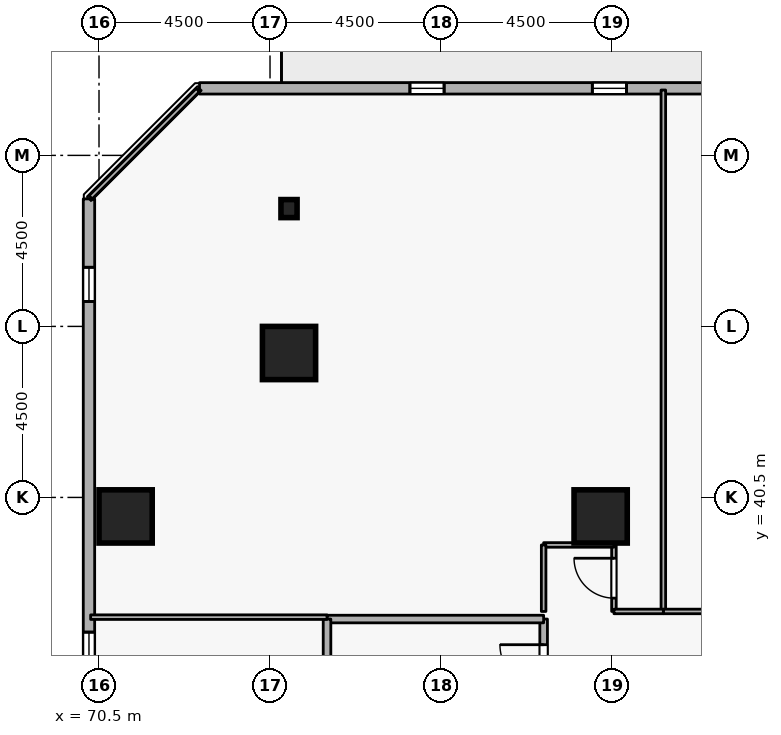
"""IFC4 building model, lengths in metres.
Left out: names, types, materials, properties, quantities, classifications, styles, units other than length and angle.
Written with IfcOpenShell. Run it as: python <this file> out.ifc"""

import sys

from ifc_helpers import new_model, si_unit, direction, frame, frame_2d, origin, origin_2d, place, context, subcontext, project, spatial, rectangle, i_section, extrude, element, fill, save


model = new_model("IFC4")
c1 = context("Model", 3, precision=1e-05, world=origin(), true_north=direction((0.0, 1.0)))
c2 = subcontext(c1, "Body", "Model", "MODEL_VIEW")
j1 = project(units=[si_unit("LENGTHUNIT", "METRE"), si_unit("PLANEANGLEUNIT", "RADIAN")], contexts=[c1])
p1 = place(None, origin())
s1 = spatial("IfcSite", under=j1, at=p1, CompositionType="ELEMENT")
p2 = place(p1, origin())
s2 = spatial("IfcBuilding", under=s1, at=p2, CompositionType="ELEMENT")
p3 = place(p2, frame((0.0, 0.0, 64.5)))
s3 = spatial("IfcBuildingStorey", under=s2, at=p3, CompositionType="ELEMENT", Elevation=64.5)
for number, where, z_axis, x_axis in (
    (1, (75.5, 44.3, 0.0), (0.0, 0.0, 1.0), (1.0, 0.0, 0.0)),
    (2, (71.2, 40.0, 0.0), (0.0, 0.0, 1.0), (1.0, 0.0, 0.0)),
    (3, (83.7, 40.0, 0.0), (0.0, 0.0, 1.0), (1.0, 0.0, 0.0)),
):
    element("IfcColumn", number, at=place(p3, frame(where, z_axis=z_axis, x_axis=x_axis)), inside=s3, PredefinedType="COLUMN", context=c2, shape_type="SweptSolid", body=[
        extrude(rectangle(XDim=1.4, YDim=1.4, at=origin_2d()), origin(), (0.0, 0.0, 1.0), 3.6),
    ])
p4 = place(p3, frame((75.5, 48.1, 0.0), z_axis=(0.0, 0.0, 1.0), x_axis=(1.0, 0.0, 0.0)))
e4 = element("IfcColumn", 4, at=p4, inside=s3, PredefinedType="COLUMN", context=c2, shape_type="SweptSolid", body=[
    extrude(i_section(OverallWidth=0.424, OverallDepth=0.475, WebThickness=0.048, FlangeThickness=0.077, FilletRadius=0.015, at=origin_2d()), origin(), (0.0, 0.0, 1.0), 3.6),
])
p5 = place(p3, frame((110.181, 51.265, 0.0), z_axis=(0.0, 0.0, 1.0), x_axis=(-0.999999999457, -3.2959355e-05, 0.0)))
e5 = element("IfcWall", 5, at=p5, inside=s3, PredefinedType="STANDARD", context=c2, shape_type="SweptSolid", body=[
    extrude(rectangle(XDim=37.037, YDim=0.3, at=frame_2d((18.518, 0.0))), origin(), (0.0, 0.0, 1.0), 2.7),
])
p6 = place(p5, frame((20.318, 0.0, 0.0)))
e6 = element("IfcOpeningElement", 6, at=p6, cuts=e5, PredefinedType="OPENING", context=c2, shape_type="SweptSolid", body=[
    extrude(rectangle(XDim=1.0, YDim=2.08, at=frame_2d((0.5, 1.04))), frame((0.0, 0.16, 0.0), z_axis=(0.0, -1.0, 0.0), x_axis=(1.0, 0.0, 0.0)), (0.0, 0.0, 1.0), 0.32),
])
p7 = place(p5, frame((1.8, 0.0, 0.72)))
e7 = element("IfcOpeningElement", 7, at=p7, cuts=e5, PredefinedType="OPENING", context=c2, shape_type="SweptSolid", body=[
    extrude(rectangle(XDim=0.9, YDim=1.75, at=frame_2d((0.45, 0.875))), frame((0.0, 0.16, 0.0), z_axis=(0.0, -1.0, 0.0), x_axis=(1.0, 0.0, 0.0)), (0.0, 0.0, 1.0), 0.32),
])
p8 = place(p5, frame((6.6, 0.0, 0.72)))
e8 = element("IfcOpeningElement", 8, at=p8, cuts=e5, PredefinedType="OPENING", context=c2, shape_type="SweptSolid", body=[
    extrude(rectangle(XDim=0.9, YDim=1.75, at=frame_2d((0.45, 0.875))), frame((0.0, 0.16, 0.0), z_axis=(0.0, -1.0, 0.0), x_axis=(1.0, 0.0, 0.0)), (0.0, 0.0, 1.0), 0.32),
])
p9 = place(p5, frame((11.4, 0.0, 0.72)))
e9 = element("IfcOpeningElement", 9, at=p9, cuts=e5, PredefinedType="OPENING", context=c2, shape_type="SweptSolid", body=[
    extrude(rectangle(XDim=0.9, YDim=1.75, at=frame_2d((0.45, 0.875))), frame((0.0, 0.16, 0.0), z_axis=(0.0, -1.0, 0.0), x_axis=(1.0, 0.0, 0.0)), (0.0, 0.0, 1.0), 0.32),
])
p10 = place(p5, frame((16.2, 0.0, 0.72)))
e10 = element("IfcOpeningElement", 10, at=p10, cuts=e5, PredefinedType="OPENING", context=c2, shape_type="SweptSolid", body=[
    extrude(rectangle(XDim=0.9, YDim=1.75, at=frame_2d((0.45, 0.875))), frame((0.0, 0.16, 0.0), z_axis=(0.0, -1.0, 0.0), x_axis=(1.0, 0.0, 0.0)), (0.0, 0.0, 1.0), 0.32),
])
p11 = place(p5, frame((25.8, 0.0, 0.72)))
e11 = element("IfcOpeningElement", 11, at=p11, cuts=e5, PredefinedType="OPENING", context=c2, shape_type="SweptSolid", body=[
    extrude(rectangle(XDim=0.9, YDim=1.75, at=frame_2d((0.45, 0.875))), frame((0.0, 0.16, 0.0), z_axis=(0.0, -1.0, 0.0), x_axis=(1.0, 0.0, 0.0)), (0.0, 0.0, 1.0), 0.32),
])
p12 = place(p5, frame((30.6, 0.0, 0.72)))
e12 = element("IfcOpeningElement", 12, at=p12, cuts=e5, PredefinedType="OPENING", context=c2, shape_type="SweptSolid", body=[
    extrude(rectangle(XDim=0.9, YDim=1.75, at=frame_2d((0.45, 0.875))), frame((0.0, 0.16, 0.0), z_axis=(0.0, -1.0, 0.0), x_axis=(1.0, 0.0, 0.0)), (0.0, 0.0, 1.0), 0.32),
])
p13 = place(p3, frame((70.236, 48.355, 0.0), z_axis=(0.0, 0.0, 1.0), x_axis=(-3.2959355e-05, -0.999999999457, 0.0)))
e13 = element("IfcWall", 13, at=p13, inside=s3, PredefinedType="STANDARD", context=c2, shape_type="SweptSolid", body=[
    extrude(rectangle(XDim=37.037, YDim=0.3, at=frame_2d((18.518, 0.0))), origin(), (0.0, 0.0, 1.0), 2.7),
])
p14 = place(p13, frame((1.8, 0.0, 0.72)))
e14 = element("IfcOpeningElement", 14, at=p14, cuts=e13, PredefinedType="OPENING", context=c2, shape_type="SweptSolid", body=[
    extrude(rectangle(XDim=0.9, YDim=1.75, at=frame_2d((0.45, 0.875))), frame((0.0, 0.16, 0.0), z_axis=(0.0, -1.0, 0.0), x_axis=(1.0, 0.0, 0.0)), (0.0, 0.0, 1.0), 0.32),
])
p15 = place(p13, frame((11.4, 0.0, 0.72)))
e15 = element("IfcOpeningElement", 15, at=p15, cuts=e13, PredefinedType="OPENING", context=c2, shape_type="SweptSolid", body=[
    extrude(rectangle(XDim=0.9, YDim=1.75, at=frame_2d((0.45, 0.875))), frame((0.0, 0.16, 0.0), z_axis=(0.0, -1.0, 0.0), x_axis=(1.0, 0.0, 0.0)), (0.0, 0.0, 1.0), 0.32),
])
p16 = place(p13, frame((16.2, 0.0, 0.72)))
e16 = element("IfcOpeningElement", 16, at=p16, cuts=e13, PredefinedType="OPENING", context=c2, shape_type="SweptSolid", body=[
    extrude(rectangle(XDim=0.9, YDim=1.75, at=frame_2d((0.45, 0.875))), frame((0.0, 0.16, 0.0), z_axis=(0.0, -1.0, 0.0), x_axis=(1.0, 0.0, 0.0)), (0.0, 0.0, 1.0), 0.32),
])
p17 = place(p13, frame((25.8, 0.0, 0.72)))
e17 = element("IfcOpeningElement", 17, at=p17, cuts=e13, PredefinedType="OPENING", context=c2, shape_type="SweptSolid", body=[
    extrude(rectangle(XDim=0.9, YDim=1.75, at=frame_2d((0.45, 0.875))), frame((0.0, 0.16, 0.0), z_axis=(0.0, -1.0, 0.0), x_axis=(1.0, 0.0, 0.0)), (0.0, 0.0, 1.0), 0.32),
])
p18 = place(p13, frame((30.6, 0.0, 0.72)))
e18 = element("IfcOpeningElement", 18, at=p18, cuts=e13, PredefinedType="OPENING", context=c2, shape_type="SweptSolid", body=[
    extrude(rectangle(XDim=0.9, YDim=1.75, at=frame_2d((0.45, 0.875))), frame((0.0, 0.16, 0.0), z_axis=(0.0, -1.0, 0.0), x_axis=(1.0, 0.0, 0.0)), (0.0, 0.0, 1.0), 0.32),
])
p19 = place(p3, frame((82.2, 34.8, 0.0), z_axis=(0.0, 0.0, 1.0), x_axis=(0.0, 1.0, 0.0)))
e19 = element("IfcWall", 19, at=p19, inside=s3, PredefinedType="STANDARD", context=c2, shape_type="SweptSolid", body=[
    extrude(rectangle(XDim=2.5, YDim=0.2, at=frame_2d((1.25, 0.0))), origin(), (0.0, 0.0, 1.0), 3.34),
])
p20 = place(p19, frame((0.675, 0.0, 0.0)))
e20 = element("IfcOpeningElement", 20, at=p20, cuts=e19, PredefinedType="OPENING", context=c2, shape_type="SweptSolid", body=[
    extrude(rectangle(XDim=1.15, YDim=2.1, at=frame_2d((0.575, 1.05))), frame((0.0, 0.11, 0.0), z_axis=(0.0, -1.0, 0.0), x_axis=(1.0, 0.0, 0.0)), (0.0, 0.0, 1.0), 0.22),
])
p21 = place(p3, frame((82.2, 37.3, 0.0), z_axis=(0.0, 0.0, 1.0), x_axis=(-1.0, 0.0, 0.0)))
e21 = element("IfcWall", 21, at=p21, inside=s3, PredefinedType="STANDARD", context=c2, shape_type="SweptSolid", body=[
    extrude(rectangle(XDim=5.7, YDim=0.2, at=frame_2d((2.85, 0.0))), origin(), (0.0, 0.0, 1.0), 3.34),
])
p22 = place(p3, frame((76.5, 37.3, 0.0), z_axis=(0.0, 0.0, 1.0), x_axis=(0.0, -1.0, 0.0)))
e22 = element("IfcWall", 22, at=p22, inside=s3, PredefinedType="STANDARD", context=c2, shape_type="SweptSolid", body=[
    extrude(rectangle(XDim=2.5, YDim=0.2, at=frame_2d((1.25, 0.0))), origin(), (0.0, 0.0, 1.0), 3.34),
])
p23 = place(p3, frame((85.35, 37.5, 0.0), z_axis=(0.0, 0.0, 1.0), x_axis=(0.0, 1.0, 0.0)))
e23 = element("IfcWall", 23, at=p23, inside=s3, PredefinedType="PARTITIONING", context=c2, shape_type="SweptSolid", body=[
    extrude(rectangle(XDim=13.72, YDim=0.12, at=frame_2d((6.86, 0.0))), origin(), (0.0, 0.0, 1.0), 3.34),
])
p24 = place(p3, frame((88.5, 37.5, 0.0), z_axis=(0.0, 0.0, 1.0), x_axis=(-1.0, 0.0, 0.0)))
e24 = element("IfcWall", 24, at=p24, inside=s3, PredefinedType="PARTITIONING", context=c2, shape_type="SweptSolid", body=[
    extrude(rectangle(XDim=3.15, YDim=0.12, at=frame_2d((1.575, 0.0))), origin(), (0.0, 0.0, 1.0), 3.34),
])
p25 = place(p24, frame((1.1, 0.0, 0.0)))
e25 = element("IfcOpeningElement", 25, at=p25, cuts=e24, PredefinedType="OPENING", context=c2, shape_type="SweptSolid", body=[
    extrude(rectangle(XDim=0.95, YDim=2.1, at=frame_2d((0.475, 1.05))), frame((0.0, 0.07, 0.0), z_axis=(0.0, -1.0, 0.0), x_axis=(1.0, 0.0, 0.0)), (0.0, 0.0, 1.0), 0.14),
])
p26 = place(p3, frame((84.05, 37.5, 0.0), z_axis=(0.0, 0.0, 1.0), x_axis=(0.0, 1.0, 0.0)))
e26 = element("IfcWall", 26, at=p26, inside=s3, PredefinedType="PARTITIONING", context=c2, shape_type="SweptSolid", body=[
    extrude(rectangle(XDim=1.75, YDim=0.12, at=frame_2d((0.875, 0.0))), origin(), (0.0, 0.0, 1.0), 3.34),
])
p27 = place(p26, frame((0.35, 0.0, 0.0)))
e27 = element("IfcOpeningElement", 27, at=p27, cuts=e26, PredefinedType="OPENING", context=c2, shape_type="SweptSolid", body=[
    extrude(rectangle(XDim=1.05, YDim=2.1, at=frame_2d((0.525, 1.05))), frame((0.0, 0.07, 0.0), z_axis=(0.0, -1.0, 0.0), x_axis=(1.0, 0.0, 0.0)), (0.0, 0.0, 1.0), 0.14),
])
p28 = place(p3, frame((84.05, 39.25, 0.0), z_axis=(0.0, 0.0, 1.0), x_axis=(-1.0, 0.0, 0.0)))
e28 = element("IfcWall", 28, at=p28, inside=s3, PredefinedType="PARTITIONING", context=c2, shape_type="SweptSolid", body=[
    extrude(rectangle(XDim=1.85, YDim=0.12, at=frame_2d((0.925, 0.0))), origin(), (0.0, 0.0, 1.0), 3.34),
])
p29 = place(p3, frame((82.2, 39.25, 0.0), z_axis=(0.0, 0.0, 1.0), x_axis=(0.0, -1.0, 0.0)))
e29 = element("IfcWall", 29, at=p29, inside=s3, PredefinedType="PARTITIONING", context=c2, shape_type="SweptSolid", body=[
    extrude(rectangle(XDim=1.75, YDim=0.12, at=frame_2d((0.875, 0.0))), origin(), (0.0, 0.0, 1.0), 3.34),
])
p30 = place(p3, frame((76.5, 37.35, 0.0), z_axis=(0.0, 0.0, 1.0), x_axis=(-1.0, 0.0, 0.0)))
e30 = element("IfcWall", 30, at=p30, inside=s3, PredefinedType="PARTITIONING", context=c2, shape_type="SweptSolid", body=[
    extrude(rectangle(XDim=6.22, YDim=0.12, at=frame_2d((3.11, 0.0))), origin(), (0.0, 0.0, 1.0), 3.34),
])
p31 = place(p3, frame((70.28, 48.398, 0.0), z_axis=(0.0, 0.0, 1.0), x_axis=(0.707106781187, 0.707106781187, 0.0)))
e31 = element("IfcWall", 31, at=p31, inside=s3, PredefinedType="PARTITIONING", context=c2, shape_type="SweptSolid", body=[
    extrude(rectangle(XDim=3.99, YDim=0.12, at=frame_2d((1.995, 0.0))), origin(), (0.0, 0.0, 1.0), 3.34),
])
p32 = place(p3, frame((85.35, 37.5, 0.0), z_axis=(0.0, 0.0, 1.0), x_axis=(-1.0, 0.0, 0.0)))
e32 = element("IfcWall", 32, at=p32, inside=s3, PredefinedType="PARTITIONING", context=c2, shape_type="SweptSolid", body=[
    extrude(rectangle(XDim=1.3, YDim=0.12, at=frame_2d((0.65, 0.0))), origin(), (0.0, 0.0, 1.0), 3.34),
])
p33 = place(p11, origin())
e33 = element("IfcWindow", 33, at=p33, inside=s3, PartitioningType="SINGLE_PANEL", PredefinedType="WINDOW", context=c2, shape_type="SweptSolid", body=[
    extrude(rectangle(XDim=0.9, YDim=1.75, at=frame_2d((0.45, 0.875))), frame((0.0, 0.03, 0.0), z_axis=(0.0, -1.0, 0.0), x_axis=(1.0, 0.0, 0.0)), (0.0, 0.0, 1.0), 0.06),
])
fill(e11, e33)
p34 = place(p12, origin())
e34 = element("IfcWindow", 34, at=p34, inside=s3, PartitioningType="SINGLE_PANEL", PredefinedType="WINDOW", context=c2, shape_type="SweptSolid", body=[
    extrude(rectangle(XDim=0.9, YDim=1.75, at=frame_2d((0.45, 0.875))), frame((0.0, 0.03, 0.0), z_axis=(0.0, -1.0, 0.0), x_axis=(1.0, 0.0, 0.0)), (0.0, 0.0, 1.0), 0.06),
])
fill(e12, e34)
p35 = place(p14, origin())
e35 = element("IfcWindow", 35, at=p35, inside=s3, PartitioningType="SINGLE_PANEL", PredefinedType="WINDOW", context=c2, shape_type="SweptSolid", body=[
    extrude(rectangle(XDim=0.9, YDim=1.75, at=frame_2d((0.45, 0.875))), frame((0.0, 0.03, 0.0), z_axis=(0.0, -1.0, 0.0), x_axis=(1.0, 0.0, 0.0)), (0.0, 0.0, 1.0), 0.06),
])
fill(e14, e35)
p36 = place(p15, origin())
e36 = element("IfcWindow", 36, at=p36, inside=s3, PartitioningType="SINGLE_PANEL", PredefinedType="WINDOW", context=c2, shape_type="SweptSolid", body=[
    extrude(rectangle(XDim=0.9, YDim=1.75, at=frame_2d((0.45, 0.875))), frame((0.0, 0.03, 0.0), z_axis=(0.0, -1.0, 0.0), x_axis=(1.0, 0.0, 0.0)), (0.0, 0.0, 1.0), 0.06),
])
fill(e15, e36)
p37 = place(p20, origin())
e37 = element("IfcDoor", 37, at=p37, inside=s3, OperationType="SINGLE_SWING_RIGHT", PredefinedType="DOOR", context=c2, shape_type="SweptSolid", body=[
    extrude(rectangle(XDim=1.15, YDim=2.1, at=frame_2d((0.575, 1.05))), frame((0.0, 0.025, 0.0), z_axis=(0.0, -1.0, 0.0), x_axis=(1.0, 0.0, 0.0)), (0.0, 0.0, 1.0), 0.05),
])
fill(e20, e37)
p38 = place(p27, origin())
e38 = element("IfcDoor", 38, at=p38, inside=s3, OperationType="SINGLE_SWING_RIGHT", PredefinedType="DOOR", context=c2, shape_type="SweptSolid", body=[
    extrude(rectangle(XDim=1.05, YDim=2.1, at=frame_2d((0.525, 1.05))), frame((0.0, 0.025, 0.0), z_axis=(0.0, -1.0, 0.0), x_axis=(1.0, 0.0, 0.0)), (0.0, 0.0, 1.0), 0.05),
])
fill(e27, e38)
save(model, sys.argv[1])
